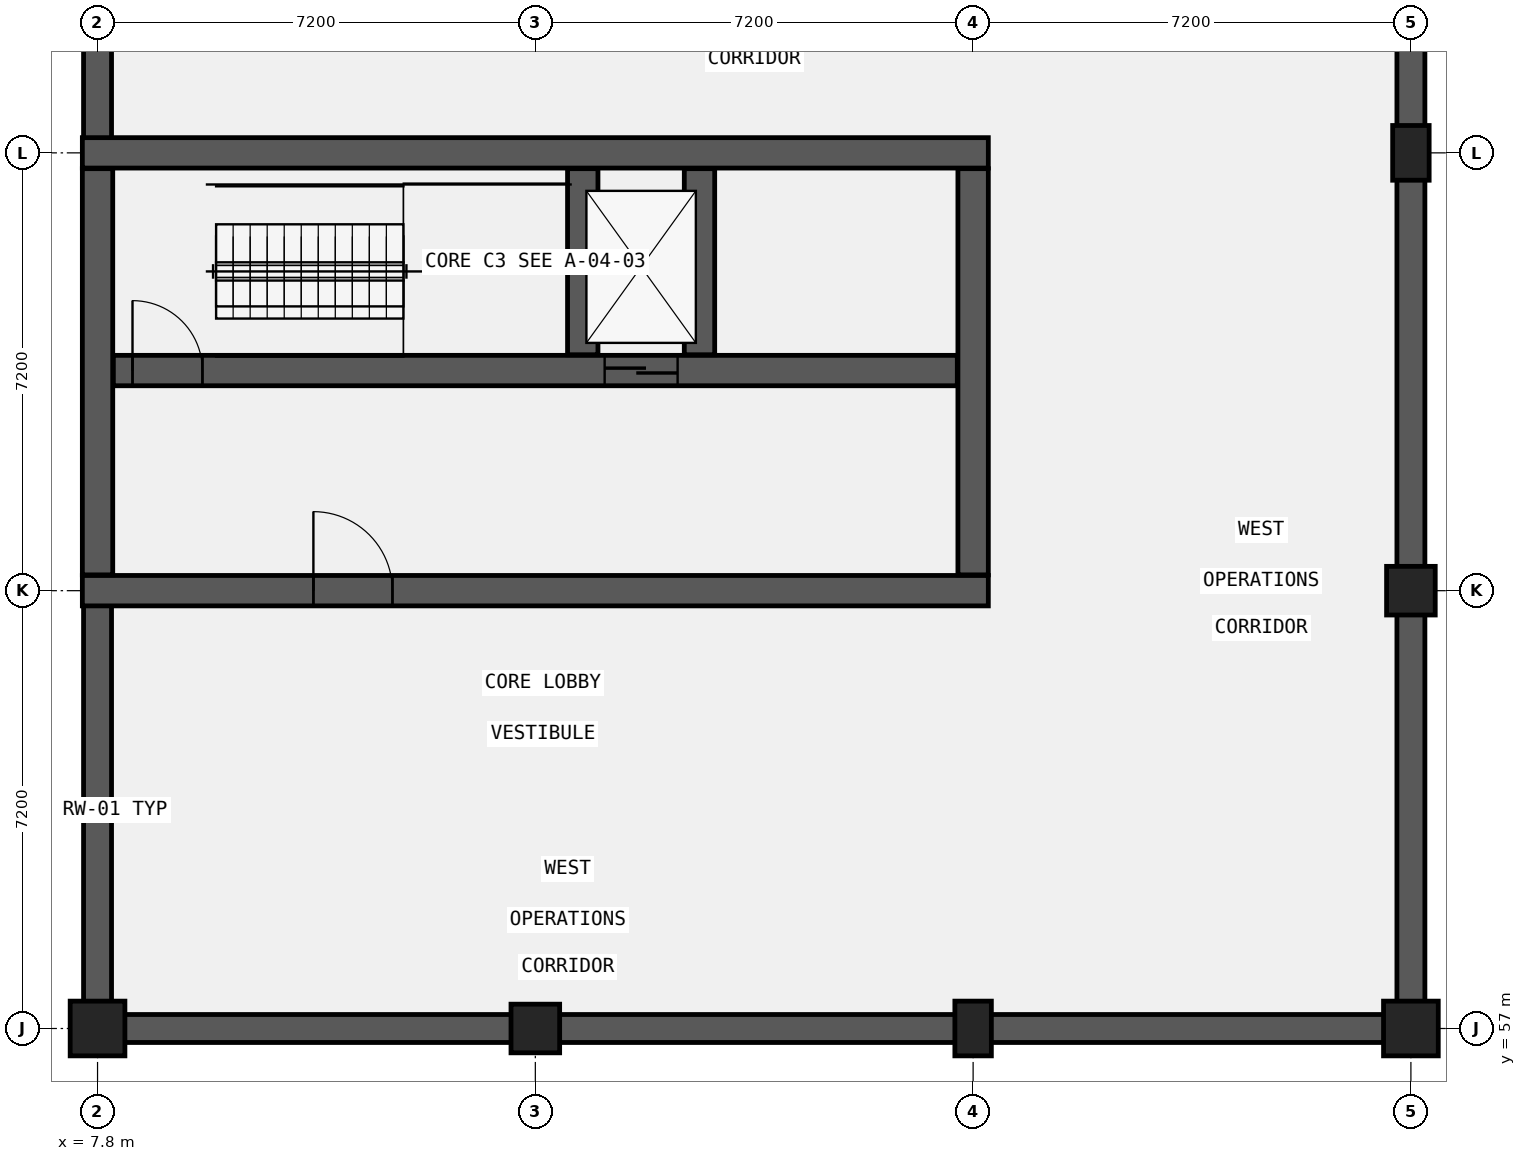
"""IFC4 building model, lengths in metres.
Left out: names, types, materials, properties, quantities, classifications, styles, units other than length and angle.
Written with IfcOpenShell. Run it as: python <this file> out.ifc"""

import sys

from ifc_helpers import new_model, si_unit, direction, frame, frame_2d, origin, origin_2d, place, context, subcontext, project, spatial, rectangle, extrude, element, fill, save


model = new_model("IFC4")
c1 = context("Model", 3, precision=1e-05, world=origin(), true_north=direction((0.0, 1.0)))
c2 = subcontext(c1, "Body", "Model", "MODEL_VIEW")
j1 = project(units=[si_unit("LENGTHUNIT", "METRE"), si_unit("PLANEANGLEUNIT", "RADIAN")], contexts=[c1])
p1 = place(None, origin())
s1 = spatial("IfcSite", under=j1, at=p1, CompositionType="ELEMENT")
p2 = place(p1, origin())
s2 = spatial("IfcBuilding", under=s1, at=p2, CompositionType="ELEMENT")
p3 = place(p2, frame((0.0, 0.0, -8.4)))
s3 = spatial("IfcBuildingStorey", under=s2, at=p3, CompositionType="ELEMENT", Elevation=-8.4)
p4 = place(p3, frame((29.4, 78.38, 0.0), z_axis=(0.0, 0.0, 1.0), x_axis=(0.0, -1.0, 0.0)))
e1 = element("IfcWall", 1, at=p4, inside=s3, PredefinedType="USERDEFINED", context=c2, shape_type="SweptSolid", body=[
    extrude(rectangle(XDim=21.16, YDim=0.46, at=frame_2d((10.58, 0.0))), origin(), (0.0, 0.0, 1.0), 2.9),
])
p5 = place(p3, frame((29.63, 57.0, 0.0), z_axis=(0.0, 0.0, 1.0), x_axis=(-1.0, 0.0, 0.0)))
e2 = element("IfcWall", 2, at=p5, inside=s3, PredefinedType="USERDEFINED", context=c2, shape_type="SweptSolid", body=[
    extrude(rectangle(XDim=22.06, YDim=0.46, at=frame_2d((11.03, 0.0))), origin(), (0.0, 0.0, 1.0), 3.25),
])
p6 = place(p3, frame((7.8, 57.22, 0.0), z_axis=(0.0, 0.0, 1.0), x_axis=(0.0, 1.0, 0.0)))
e3 = element("IfcWall", 3, at=p6, inside=s3, PredefinedType="USERDEFINED", context=c2, shape_type="SweptSolid", body=[
    extrude(rectangle(XDim=6.75, YDim=0.46, at=frame_2d((3.375, 0.0))), origin(), (0.0, 0.0, 1.0), 3.15),
])
p7 = place(p3, frame((7.8, 71.63, 0.0), z_axis=(0.0, 0.0, 1.0), x_axis=(0.0, 1.0, 0.0)))
e4 = element("IfcWall", 4, at=p7, inside=s3, PredefinedType="USERDEFINED", context=c2, shape_type="SweptSolid", body=[
    extrude(rectangle(XDim=6.75, YDim=0.46, at=frame_2d((3.375, 0.0))), origin(), (0.0, 0.0, 1.0), 3.1),
])
p8 = place(p3, frame((7.55, 71.4, 0.0), z_axis=(0.0, 0.0, 1.0), x_axis=(1.0, 0.0, 0.0)))
e5 = element("IfcWall", 5, at=p8, inside=s3, PredefinedType="SHEAR", context=c2, shape_type="SweptSolid", body=[
    extrude(rectangle(XDim=14.9, YDim=0.5, at=frame_2d((7.45, 0.0))), origin(), (0.0, 0.0, 1.0), 4.2),
])
p9 = place(p3, frame((7.55, 64.2, 0.0), z_axis=(0.0, 0.0, 1.0), x_axis=(1.0, 0.0, 0.0)))
e6 = element("IfcWall", 6, at=p9, inside=s3, PredefinedType="SHEAR", context=c2, shape_type="SweptSolid", body=[
    extrude(rectangle(XDim=14.9, YDim=0.5, at=frame_2d((7.45, 0.0))), origin(), (0.0, 0.0, 1.0), 4.2),
])
p10 = place(p9, frame((3.8, 0.0, 0.0)))
e7 = element("IfcOpeningElement", 7, at=p10, cuts=e6, PredefinedType="OPENING", context=c2, shape_type="SweptSolid", body=[
    extrude(rectangle(XDim=1.3, YDim=2.2, at=frame_2d((0.65, 1.1))), frame((0.0, 0.26, 0.0), z_axis=(0.0, -1.0, 0.0), x_axis=(1.0, 0.0, 0.0)), (0.0, 0.0, 1.0), 0.52),
])
for number, where, z_axis, x_axis in (
    (8, (7.8, 64.46, 0.0), (0.0, 0.0, 1.0), (0.0, 1.0, 0.0)),
    (9, (22.2, 64.46, 0.0), (0.0, 0.0, 1.0), (0.0, 1.0, 0.0)),
):
    element("IfcWall", number, at=place(p3, frame(where, z_axis=z_axis, x_axis=x_axis)), inside=s3, PredefinedType="SHEAR", context=c2, shape_type="SweptSolid", body=[
        extrude(rectangle(XDim=6.68, YDim=0.5, at=frame_2d((3.34, 0.0))), origin(), (0.0, 0.0, 1.0), 4.2),
    ])
p11 = place(p3, frame((8.06, 67.82, 0.0), z_axis=(0.0, 0.0, 1.0), x_axis=(1.0, 0.0, 0.0)))
e10 = element("IfcWall", 10, at=p11, inside=s3, PredefinedType="SHEAR", context=c2, shape_type="SweptSolid", body=[
    extrude(rectangle(XDim=13.88, YDim=0.5, at=frame_2d((6.94, 0.0))), origin(), (0.0, 0.0, 1.0), 4.2),
])
p12 = place(p11, frame((8.08, 0.0, 0.0)))
e11 = element("IfcOpeningElement", 11, at=p12, cuts=e10, PredefinedType="OPENING", context=c2, shape_type="SweptSolid", body=[
    extrude(rectangle(XDim=1.2, YDim=2.15, at=frame_2d((0.6, 1.075))), frame((0.0, 0.26, 0.0), z_axis=(0.0, -1.0, 0.0), x_axis=(1.0, 0.0, 0.0)), (0.0, 0.0, 1.0), 0.52),
])
p13 = place(p11, frame((0.315, 0.0, 0.0)))
e12 = element("IfcOpeningElement", 12, at=p13, cuts=e10, PredefinedType="OPENING", context=c2, shape_type="SweptSolid", body=[
    extrude(rectangle(XDim=1.15, YDim=2.15, at=frame_2d((0.575, 1.075))), frame((0.0, 0.26, 0.0), z_axis=(0.0, -1.0, 0.0), x_axis=(1.0, 0.0, 0.0)), (0.0, 0.0, 1.0), 0.52),
])
for number, where, z_axis, x_axis in (
    (13, (15.78, 68.08, 0.0), (0.0, 0.0, 1.0), (0.0, 1.0, 0.0)),
    (14, (17.7, 68.08, 0.0), (0.0, 0.0, 1.0), (0.0, 1.0, 0.0)),
):
    element("IfcWall", number, at=place(p3, frame(where, z_axis=z_axis, x_axis=x_axis)), inside=s3, PredefinedType="SHEAR", context=c2, shape_type="SweptSolid", body=[
        extrude(rectangle(XDim=3.06, YDim=0.5, at=frame_2d((1.53, 0.0))), origin(), (0.0, 0.0, 1.0), 4.2),
    ])
p14 = place(p3, frame((7.8, 57.0, 0.0), z_axis=(0.0, 0.0, 1.0), x_axis=(1.0, 0.0, 0.0)))
e15 = element("IfcColumn", 15, at=p14, inside=s3, PredefinedType="COLUMN", context=c2, shape_type="SweptSolid", body=[
    extrude(rectangle(XDim=0.9, YDim=0.9, at=origin_2d()), origin(), (0.0, 0.0, 1.0), 4.2),
])
p15 = place(p3, frame((15.0, 57.0, 0.0), z_axis=(0.0, 0.0, 1.0), x_axis=(1.0, 0.0, 0.0)))
e16 = element("IfcColumn", 16, at=p15, inside=s3, PredefinedType="COLUMN", context=c2, shape_type="SweptSolid", body=[
    extrude(rectangle(XDim=0.8, YDim=0.8, at=origin_2d()), origin(), (0.0, 0.0, 1.0), 4.2),
])
p16 = place(p3, frame((22.2, 57.0, 0.0), z_axis=(0.0, 0.0, 1.0), x_axis=(1.0, 0.0, 0.0)))
e17 = element("IfcColumn", 17, at=p16, inside=s3, PredefinedType="COLUMN", context=c2, shape_type="SweptSolid", body=[
    extrude(rectangle(XDim=0.6, YDim=0.9, at=origin_2d()), origin(), (0.0, 0.0, 1.0), 4.2),
])
p17 = place(p3, frame((29.4, 57.0, 0.0), z_axis=(0.0, 0.0, 1.0), x_axis=(1.0, 0.0, 0.0)))
e18 = element("IfcColumn", 18, at=p17, inside=s3, PredefinedType="COLUMN", context=c2, shape_type="SweptSolid", body=[
    extrude(rectangle(XDim=0.9, YDim=0.9, at=origin_2d()), origin(), (0.0, 0.0, 1.0), 4.2),
])
p18 = place(p3, frame((29.4, 64.2, 0.0), z_axis=(0.0, 0.0, 1.0), x_axis=(1.0, 0.0, 0.0)))
e19 = element("IfcColumn", 19, at=p18, inside=s3, PredefinedType="COLUMN", context=c2, shape_type="SweptSolid", body=[
    extrude(rectangle(XDim=0.8, YDim=0.8, at=origin_2d()), origin(), (0.0, 0.0, 1.0), 4.2),
])
p19 = place(p3, frame((29.4, 71.4, 0.0), z_axis=(0.0, 0.0, 1.0), x_axis=(1.0, 0.0, 0.0)))
e20 = element("IfcColumn", 20, at=p19, inside=s3, PredefinedType="COLUMN", context=c2, shape_type="SweptSolid", body=[
    extrude(rectangle(XDim=0.6, YDim=0.9, at=origin_2d()), origin(), (0.0, 0.0, 1.0), 4.2),
])
p20 = place(p12, frame((1.2, 0.0, 0.0), z_axis=(0.0, 0.0, 1.0), x_axis=(-1.0, 0.0, 0.0)))
e21 = element("IfcDoor", 21, at=p20, inside=s3, OperationType="DOUBLE_DOOR_SLIDING", PredefinedType="DOOR", context=c2, shape_type="SweptSolid", body=[
    extrude(rectangle(XDim=1.2, YDim=2.15, at=frame_2d((0.6, 1.075))), frame((0.0, 0.025, 0.0), z_axis=(0.0, -1.0, 0.0), x_axis=(1.0, 0.0, 0.0)), (0.0, 0.0, 1.0), 0.05),
])
fill(e11, e21)
p21 = place(p13, origin())
e22 = element("IfcDoor", 22, at=p21, inside=s3, OperationType="SINGLE_SWING_LEFT", PredefinedType="DOOR", context=c2, shape_type="SweptSolid", body=[
    extrude(rectangle(XDim=1.15, YDim=2.15, at=frame_2d((0.575, 1.075))), frame((0.0, 0.025, 0.0), z_axis=(0.0, -1.0, 0.0), x_axis=(1.0, 0.0, 0.0)), (0.0, 0.0, 1.0), 0.05),
])
fill(e12, e22)
p22 = place(p10, frame((1.3, 0.0, 0.0), z_axis=(0.0, 0.0, 1.0), x_axis=(-1.0, 0.0, 0.0)))
e23 = element("IfcDoor", 23, at=p22, inside=s3, OperationType="SINGLE_SWING_LEFT", PredefinedType="DOOR", context=c2, shape_type="SweptSolid", body=[
    extrude(rectangle(XDim=1.3, YDim=2.2, at=frame_2d((0.65, 1.1))), frame((0.0, 0.025, 0.0), z_axis=(0.0, -1.0, 0.0), x_axis=(1.0, 0.0, 0.0)), (0.0, 0.0, 1.0), 0.05),
])
fill(e7, e23)
save(model, sys.argv[1])
